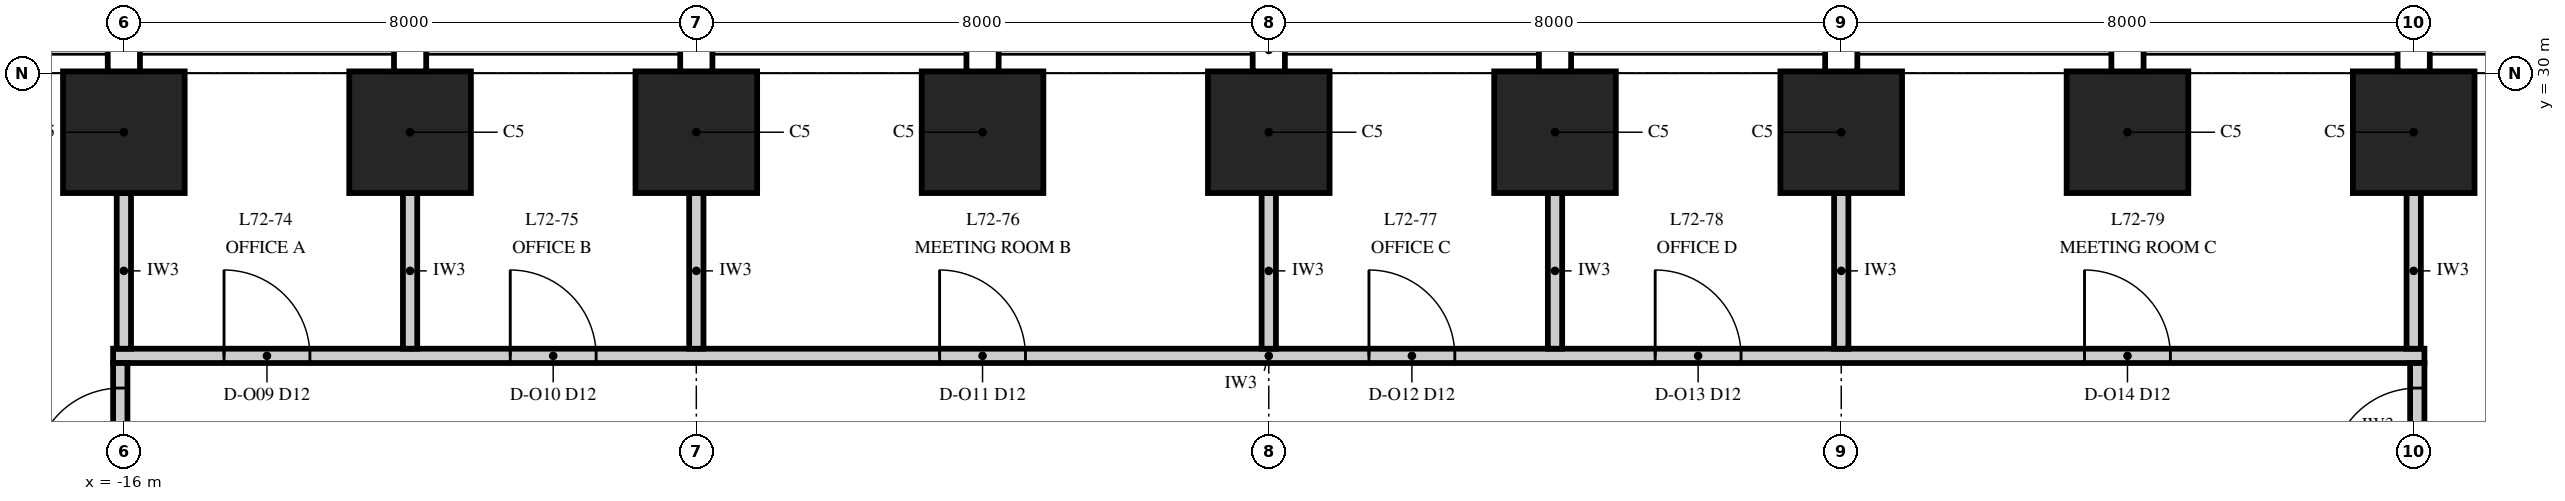
"""IFC4 building model, lengths in metres.
Left out: names, types, materials, properties, quantities, classifications, styles, units other than length and angle.
Written with IfcOpenShell. Run it as: python <this file> out.ifc"""

import sys

from ifc_helpers import new_model, si_unit, direction, frame, frame_2d, origin, origin_2d, place, context, subcontext, project, spatial, rectangle, extrude, element, fill, save


model = new_model("IFC4")
c1 = context("Model", 3, precision=1e-05, world=origin(), true_north=direction((0.0, 1.0)))
c2 = subcontext(c1, "Body", "Model", "MODEL_VIEW")
j1 = project(units=[si_unit("LENGTHUNIT", "METRE"), si_unit("PLANEANGLEUNIT", "RADIAN")], contexts=[c1])
p1 = place(None, origin())
s1 = spatial("IfcSite", under=j1, at=p1, CompositionType="ELEMENT")
p2 = place(p1, origin())
s2 = spatial("IfcBuilding", under=s1, at=p2, CompositionType="ELEMENT")
p3 = place(p2, frame((0.0, 0.0, 308.0)))
s3 = spatial("IfcBuildingStorey", under=s2, at=p3, CompositionType="ELEMENT", Elevation=308.0)
for number, where, z_axis, x_axis in (
    (1, (16.0, 29.175, 0.0), (0.0, 0.0, 1.0), (-1.0, 0.0, 0.0)),
    (2, (12.0, 29.175, 0.0), (0.0, 0.0, 1.0), (-1.0, 0.0, 0.0)),
    (3, (8.0, 29.175, 0.0), (0.0, 0.0, 1.0), (-1.0, 0.0, 0.0)),
    (4, (4.0, 29.175, 0.0), (0.0, 0.0, 1.0), (-1.0, 0.0, 0.0)),
    (5, (0.0, 29.175, 0.0), (0.0, 0.0, 1.0), (-1.0, 0.0, 0.0)),
    (6, (-4.0, 29.175, 0.0), (0.0, 0.0, 1.0), (-1.0, 0.0, 0.0)),
    (7, (-8.0, 29.175, 0.0), (0.0, 0.0, 1.0), (-1.0, 0.0, 0.0)),
    (8, (-12.0, 29.175, 0.0), (0.0, 0.0, 1.0), (-1.0, 0.0, 0.0)),
    (9, (-16.0, 29.175, 0.0), (0.0, 0.0, 1.0), (-1.0, 0.0, 0.0)),
):
    element("IfcColumn", number, at=place(p3, frame(where, z_axis=z_axis, x_axis=x_axis)), inside=s3, PredefinedType="COLUMN", context=c2, shape_type="SweptSolid", body=[
        extrude(rectangle(XDim=1.7, YDim=1.7, at=origin_2d()), origin(), (0.0, 0.0, 1.0), 4.0),
    ])
p4 = place(p3, frame((-16.15, 26.05, 0.0), z_axis=(0.0, 0.0, 1.0), x_axis=(1.0, 0.0, 0.0)))
e10 = element("IfcWall", 10, at=p4, inside=s3, PredefinedType="PARTITIONING", context=c2, shape_type="SweptSolid", body=[
    extrude(rectangle(XDim=32.3, YDim=0.2, at=frame_2d((16.15, 0.0))), origin(), (0.0, 0.0, 1.0), 3.418),
])
p5 = place(p4, frame((1.55, 0.0, 0.0)))
e11 = element("IfcOpeningElement", 11, at=p5, cuts=e10, PredefinedType="OPENING", context=c2, shape_type="SweptSolid", body=[
    extrude(rectangle(XDim=1.2, YDim=2.4, at=frame_2d((0.6, 1.2))), frame((0.0, 0.115, 0.0), z_axis=(0.0, -1.0, 0.0), x_axis=(1.0, 0.0, 0.0)), (0.0, 0.0, 1.0), 0.23),
])
p6 = place(p4, frame((5.55, 0.0, 0.0)))
e12 = element("IfcOpeningElement", 12, at=p6, cuts=e10, PredefinedType="OPENING", context=c2, shape_type="SweptSolid", body=[
    extrude(rectangle(XDim=1.2, YDim=2.4, at=frame_2d((0.6, 1.2))), frame((0.0, 0.115, 0.0), z_axis=(0.0, -1.0, 0.0), x_axis=(1.0, 0.0, 0.0)), (0.0, 0.0, 1.0), 0.23),
])
p7 = place(p4, frame((11.55, 0.0, 0.0)))
e13 = element("IfcOpeningElement", 13, at=p7, cuts=e10, PredefinedType="OPENING", context=c2, shape_type="SweptSolid", body=[
    extrude(rectangle(XDim=1.2, YDim=2.4, at=frame_2d((0.6, 1.2))), frame((0.0, 0.115, 0.0), z_axis=(0.0, -1.0, 0.0), x_axis=(1.0, 0.0, 0.0)), (0.0, 0.0, 1.0), 0.23),
])
p8 = place(p4, frame((17.55, 0.0, 0.0)))
e14 = element("IfcOpeningElement", 14, at=p8, cuts=e10, PredefinedType="OPENING", context=c2, shape_type="SweptSolid", body=[
    extrude(rectangle(XDim=1.2, YDim=2.4, at=frame_2d((0.6, 1.2))), frame((0.0, 0.115, 0.0), z_axis=(0.0, -1.0, 0.0), x_axis=(1.0, 0.0, 0.0)), (0.0, 0.0, 1.0), 0.23),
])
p9 = place(p4, frame((21.55, 0.0, 0.0)))
e15 = element("IfcOpeningElement", 15, at=p9, cuts=e10, PredefinedType="OPENING", context=c2, shape_type="SweptSolid", body=[
    extrude(rectangle(XDim=1.2, YDim=2.4, at=frame_2d((0.6, 1.2))), frame((0.0, 0.115, 0.0), z_axis=(0.0, -1.0, 0.0), x_axis=(1.0, 0.0, 0.0)), (0.0, 0.0, 1.0), 0.23),
])
p10 = place(p4, frame((27.55, 0.0, 0.0)))
e16 = element("IfcOpeningElement", 16, at=p10, cuts=e10, PredefinedType="OPENING", context=c2, shape_type="SweptSolid", body=[
    extrude(rectangle(XDim=1.2, YDim=2.4, at=frame_2d((0.6, 1.2))), frame((0.0, 0.115, 0.0), z_axis=(0.0, -1.0, 0.0), x_axis=(1.0, 0.0, 0.0)), (0.0, 0.0, 1.0), 0.23),
])
p11 = place(p3, frame((-16.05, 9.9, 0.0), z_axis=(0.0, 0.0, 1.0), x_axis=(0.0, 1.0, 0.0)))
e17 = element("IfcWall", 17, at=p11, inside=s3, PredefinedType="PARTITIONING", context=c2, shape_type="SweptSolid", body=[
    extrude(rectangle(XDim=16.05, YDim=0.2, at=frame_2d((8.025, 0.0))), origin(), (0.0, 0.0, 1.0), 3.23),
])
p12 = place(p11, frame((14.5, 0.0, 0.0)))
e18 = element("IfcOpeningElement", 18, at=p12, cuts=e17, PredefinedType="OPENING", context=c2, shape_type="SweptSolid", body=[
    extrude(rectangle(XDim=1.2, YDim=2.4, at=frame_2d((0.6, 1.2))), frame((0.0, 0.115, 0.0), z_axis=(0.0, -1.0, 0.0), x_axis=(1.0, 0.0, 0.0)), (0.0, 0.0, 1.0), 0.23),
])
p13 = place(p11, frame((7.85, 0.0, 0.0)))
e19 = element("IfcOpeningElement", 19, at=p13, cuts=e17, PredefinedType="OPENING", context=c2, shape_type="SweptSolid", body=[
    extrude(rectangle(XDim=1.2, YDim=2.4, at=frame_2d((0.6, 1.2))), frame((0.0, 0.115, 0.0), z_axis=(0.0, -1.0, 0.0), x_axis=(1.0, 0.0, 0.0)), (0.0, 0.0, 1.0), 0.23),
])
for number, where, z_axis, x_axis in (
    (20, (-16.0, 26.15, 0.0), (0.0, 0.0, 1.0), (0.0, 1.0, 0.0)),
    (21, (-12.0, 26.15, 0.0), (0.0, 0.0, 1.0), (0.0, 1.0, 0.0)),
    (22, (-8.0, 26.15, 0.0), (0.0, 0.0, 1.0), (0.0, 1.0, 0.0)),
    (23, (0.0, 26.15, 0.0), (0.0, 0.0, 1.0), (0.0, 1.0, 0.0)),
    (24, (4.0, 26.15, 0.0), (0.0, 0.0, 1.0), (0.0, 1.0, 0.0)),
    (25, (8.0, 26.15, 0.0), (0.0, 0.0, 1.0), (0.0, 1.0, 0.0)),
    (26, (16.0, 26.15, 0.0), (0.0, 0.0, 1.0), (0.0, 1.0, 0.0)),
):
    element("IfcWall", number, at=place(p3, frame(where, z_axis=z_axis, x_axis=x_axis)), inside=s3, PredefinedType="PARTITIONING", context=c2, shape_type="SweptSolid", body=[
        extrude(rectangle(XDim=2.175, YDim=0.2, at=frame_2d((1.087, 0.0))), origin(), (0.0, 0.0, 1.0), 3.418),
    ])
p14 = place(p3, frame((16.05, 24.2, 0.0), z_axis=(0.0, 0.0, 1.0), x_axis=(0.0, 1.0, 0.0)))
e27 = element("IfcWall", 27, at=p14, inside=s3, PredefinedType="PARTITIONING", context=c2, shape_type="SweptSolid", body=[
    extrude(rectangle(XDim=1.75, YDim=0.2, at=frame_2d((0.875, 0.0))), origin(), (0.0, 0.0, 1.0), 3.326),
])
p15 = place(p14, frame((0.2, 0.0, 0.0)))
e28 = element("IfcOpeningElement", 28, at=p15, cuts=e27, PredefinedType="OPENING", context=c2, shape_type="SweptSolid", body=[
    extrude(rectangle(XDim=1.2, YDim=2.4, at=frame_2d((0.6, 1.2))), frame((0.0, 0.115, 0.0), z_axis=(0.0, -1.0, 0.0), x_axis=(1.0, 0.0, 0.0)), (0.0, 0.0, 1.0), 0.23),
])
p16 = place(p5, origin())
e29 = element("IfcDoor", 29, at=p16, inside=s3, OperationType="SINGLE_SWING_LEFT", PredefinedType="DOOR", context=c2, shape_type="SweptSolid", body=[
    extrude(rectangle(XDim=1.2, YDim=2.4, at=frame_2d((0.6, 1.2))), frame((0.0, 0.1, 0.0), z_axis=(0.0, -1.0, 0.0), x_axis=(1.0, 0.0, 0.0)), (0.0, 0.0, 1.0), 0.199),
])
fill(e11, e29)
p17 = place(p6, origin())
e30 = element("IfcDoor", 30, at=p17, inside=s3, OperationType="SINGLE_SWING_LEFT", PredefinedType="DOOR", context=c2, shape_type="SweptSolid", body=[
    extrude(rectangle(XDim=1.2, YDim=2.4, at=frame_2d((0.6, 1.2))), frame((0.0, 0.1, 0.0), z_axis=(0.0, -1.0, 0.0), x_axis=(1.0, 0.0, 0.0)), (0.0, 0.0, 1.0), 0.199),
])
fill(e12, e30)
p18 = place(p7, origin())
e31 = element("IfcDoor", 31, at=p18, inside=s3, OperationType="SINGLE_SWING_LEFT", PredefinedType="DOOR", context=c2, shape_type="SweptSolid", body=[
    extrude(rectangle(XDim=1.2, YDim=2.4, at=frame_2d((0.6, 1.2))), frame((0.0, 0.1, 0.0), z_axis=(0.0, -1.0, 0.0), x_axis=(1.0, 0.0, 0.0)), (0.0, 0.0, 1.0), 0.199),
])
fill(e13, e31)
p19 = place(p8, origin())
e32 = element("IfcDoor", 32, at=p19, inside=s3, OperationType="SINGLE_SWING_LEFT", PredefinedType="DOOR", context=c2, shape_type="SweptSolid", body=[
    extrude(rectangle(XDim=1.2, YDim=2.4, at=frame_2d((0.6, 1.2))), frame((0.0, 0.1, 0.0), z_axis=(0.0, -1.0, 0.0), x_axis=(1.0, 0.0, 0.0)), (0.0, 0.0, 1.0), 0.199),
])
fill(e14, e32)
p20 = place(p9, origin())
e33 = element("IfcDoor", 33, at=p20, inside=s3, OperationType="SINGLE_SWING_LEFT", PredefinedType="DOOR", context=c2, shape_type="SweptSolid", body=[
    extrude(rectangle(XDim=1.2, YDim=2.4, at=frame_2d((0.6, 1.2))), frame((0.0, 0.1, 0.0), z_axis=(0.0, -1.0, 0.0), x_axis=(1.0, 0.0, 0.0)), (0.0, 0.0, 1.0), 0.199),
])
fill(e15, e33)
p21 = place(p10, origin())
e34 = element("IfcDoor", 34, at=p21, inside=s3, OperationType="SINGLE_SWING_LEFT", PredefinedType="DOOR", context=c2, shape_type="SweptSolid", body=[
    extrude(rectangle(XDim=1.2, YDim=2.4, at=frame_2d((0.6, 1.2))), frame((0.0, 0.1, 0.0), z_axis=(0.0, -1.0, 0.0), x_axis=(1.0, 0.0, 0.0)), (0.0, 0.0, 1.0), 0.199),
])
fill(e16, e34)
p22 = place(p12, origin())
e35 = element("IfcDoor", 35, at=p22, inside=s3, OperationType="SINGLE_SWING_LEFT", PredefinedType="DOOR", context=c2, shape_type="SweptSolid", body=[
    extrude(rectangle(XDim=1.2, YDim=2.4, at=frame_2d((0.6, 1.2))), frame((0.0, 0.1, 0.0), z_axis=(0.0, -1.0, 0.0), x_axis=(1.0, 0.0, 0.0)), (0.0, 0.0, 1.0), 0.199),
])
fill(e18, e35)
p23 = place(p15, origin())
e36 = element("IfcDoor", 36, at=p23, inside=s3, OperationType="SINGLE_SWING_LEFT", PredefinedType="DOOR", context=c2, shape_type="SweptSolid", body=[
    extrude(rectangle(XDim=1.2, YDim=2.4, at=frame_2d((0.6, 1.2))), frame((0.0, 0.1, 0.0), z_axis=(0.0, -1.0, 0.0), x_axis=(1.0, 0.0, 0.0)), (0.0, 0.0, 1.0), 0.199),
])
fill(e28, e36)
save(model, sys.argv[1])
